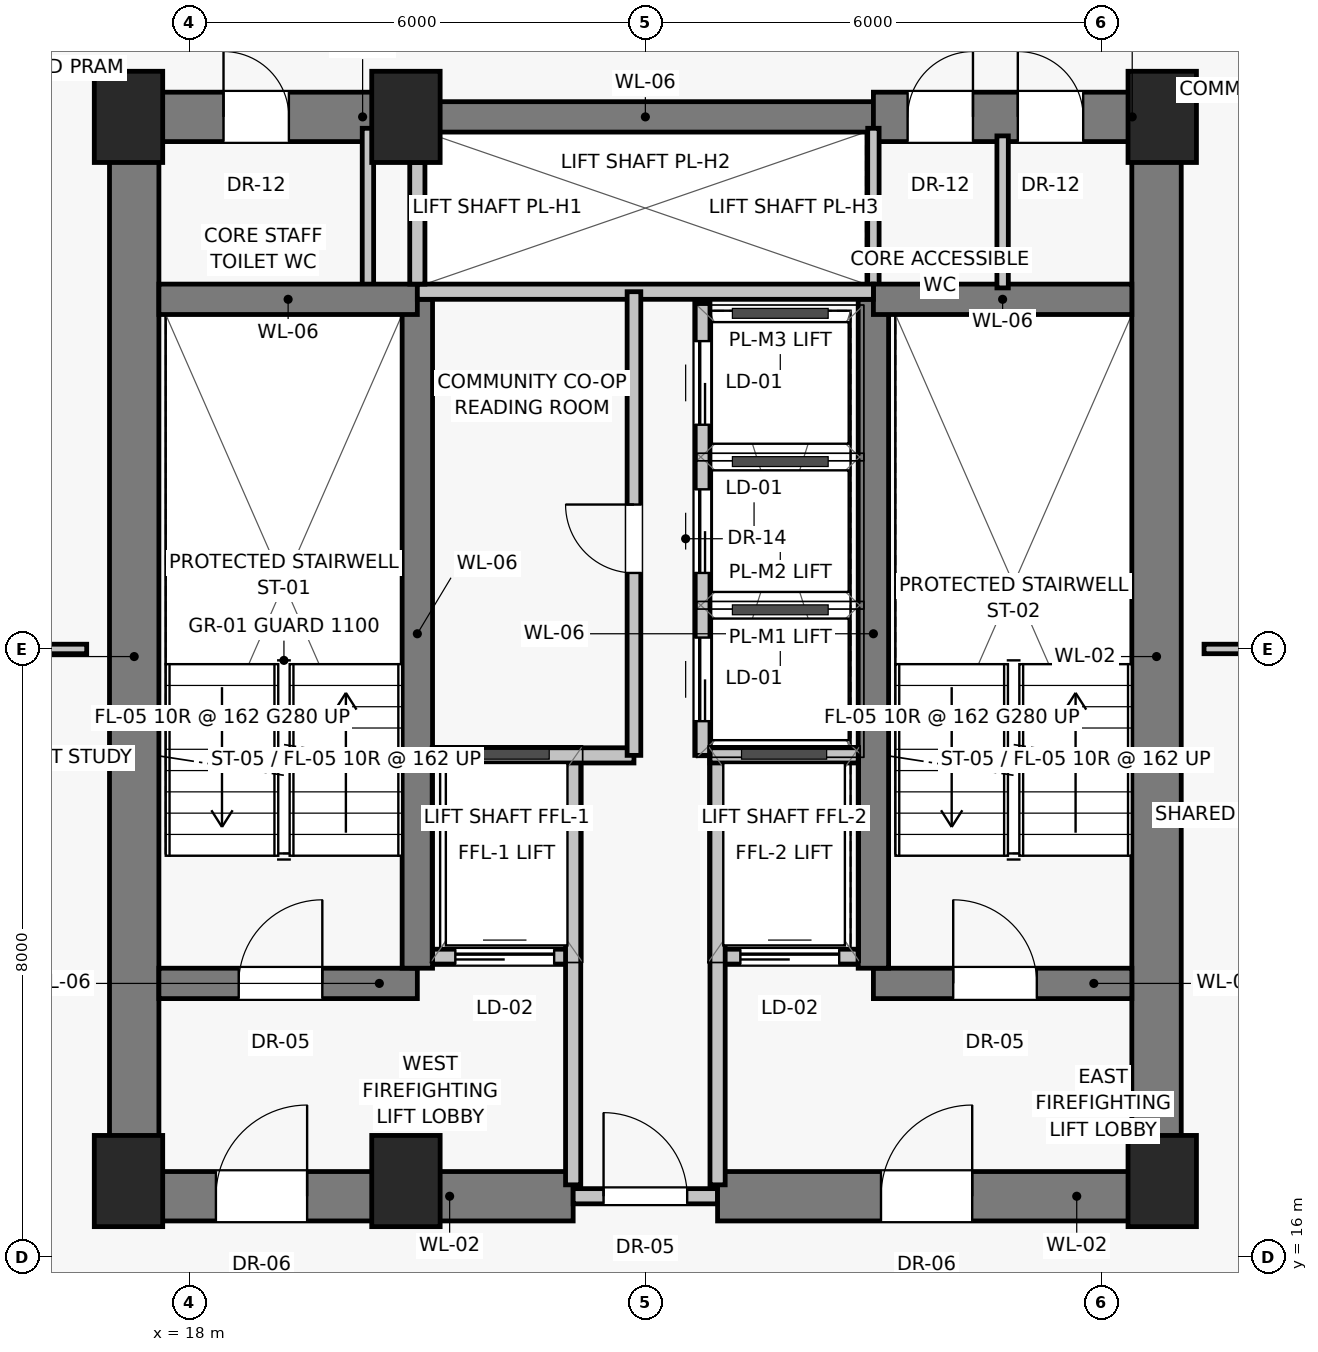
"""IFC4 building model, lengths in metres.
Left out: names, types, materials, properties, quantities, classifications, styles, units other than length and angle.
Written with IfcOpenShell. Run it as: python <this file> out.ifc"""

import sys

from ifc_helpers import new_model, si_unit, direction, frame, frame_2d, origin, origin_2d, place, context, subcontext, project, spatial, rectangle, extrude, source, transform, mapped, element, fill, save


model = new_model("IFC4")
c1 = context("Model", 3, precision=1e-05, world=origin(), true_north=direction((0.0, 1.0)))
c2 = subcontext(c1, "Body", "Model", "MODEL_VIEW")
j1 = project(units=[si_unit("LENGTHUNIT", "METRE"), si_unit("PLANEANGLEUNIT", "RADIAN")], contexts=[c1])
p1 = place(None, origin())
s1 = spatial("IfcSite", under=j1, at=p1, CompositionType="ELEMENT")
p2 = place(p1, origin())
s2 = spatial("IfcBuilding", under=s1, at=p2, CompositionType="ELEMENT")
p3 = place(p2, frame((0.0, 0.0, 126.25)))
s3 = spatial("IfcBuildingStorey", under=s2, at=p3, CompositionType="ELEMENT", Elevation=126.25)
for number, where, z_axis, x_axis in (
    (1, (17.2, 17.0, 0.0), (0.0, 0.0, 1.0), (1.0, 0.0, 0.0)),
    (2, (20.85, 17.0, 0.0), (0.0, 0.0, 1.0), (1.0, 0.0, 0.0)),
    (3, (30.8, 17.0, 0.0), (0.0, 0.0, 1.0), (1.0, 0.0, 0.0)),
    (4, (17.2, 31.0, 0.0), (0.0, 0.0, 1.0), (1.0, 0.0, 0.0)),
    (5, (20.85, 31.0, 0.0), (0.0, 0.0, 1.0), (1.0, 0.0, 0.0)),
    (6, (30.8, 31.0, 0.0), (0.0, 0.0, 1.0), (1.0, 0.0, 0.0)),
):
    element("IfcColumn", number, at=place(p3, frame(where, z_axis=z_axis, x_axis=x_axis)), inside=s3, PredefinedType="PILASTER", context=c2, shape_type="SweptSolid", body=[
        extrude(rectangle(XDim=0.9, YDim=1.2, at=origin_2d()), origin(), (0.0, 0.0, 1.0), 3.25),
    ])
for number, where, z_axis, x_axis in (
    (7, (17.275, 16.8, 0.0), (0.0, 0.0, 1.0), (0.0, 1.0, 0.0)),
    (8, (30.725, 16.8, 0.0), (0.0, 0.0, 1.0), (0.0, 1.0, 0.0)),
):
    element("IfcWall", number, at=place(p3, frame(where, z_axis=z_axis, x_axis=x_axis)), inside=s3, PredefinedType="SHEAR", context=c2, shape_type="SweptSolid", body=[
        extrude(rectangle(XDim=14.2, YDim=0.65, at=frame_2d((7.1, 0.0))), origin(), (0.0, 0.0, 1.0), 3.0),
    ])
p4 = place(p3, frame((17.2, 16.8, 0.0), z_axis=(0.0, 0.0, 1.0), x_axis=(1.0, 0.0, 0.0)))
e9 = element("IfcWall", 9, at=p4, inside=s3, PredefinedType="SHEAR", context=c2, shape_type="SweptSolid", body=[
    extrude(rectangle(XDim=5.85, YDim=0.65, at=frame_2d((2.925, 0.0))), origin(), (0.0, 0.0, 1.0), 3.0),
])
p5 = place(p4, frame((1.15, 0.0, 0.0)))
e10 = element("IfcOpeningElement", 10, at=p5, cuts=e9, PredefinedType="OPENING", context=c2, shape_type="SweptSolid", body=[
    extrude(rectangle(XDim=1.2, YDim=2.03, at=frame_2d((0.6, 1.015))), frame((0.0, 0.335, 0.0), z_axis=(0.0, -1.0, 0.0), x_axis=(1.0, 0.0, 0.0)), (0.0, 0.0, 1.0), 0.67),
])
p6 = place(p3, frame((23.05, 16.8, 0.0), z_axis=(0.0, 0.0, 1.0), x_axis=(1.0, 0.0, 0.0)))
e11 = element("IfcWall", 11, at=p6, inside=s3, PredefinedType="SOLIDWALL", context=c2, shape_type="SweptSolid", body=[
    extrude(rectangle(XDim=1.9, YDim=0.2, at=frame_2d((0.95, 0.0))), origin(), (0.0, 0.0, 1.0), 2.15),
])
p7 = place(p6, frame((0.4, 0.0, 0.0)))
e12 = element("IfcOpeningElement", 12, at=p7, cuts=e11, PredefinedType="OPENING", context=c2, shape_type="SweptSolid", body=[
    extrude(rectangle(XDim=1.1, YDim=2.03, at=frame_2d((0.55, 1.015))), frame((0.0, 0.11, 0.0), z_axis=(0.0, -1.0, 0.0), x_axis=(1.0, 0.0, 0.0)), (0.0, 0.0, 1.0), 0.22),
])
p8 = place(p3, frame((24.95, 16.8, 0.0), z_axis=(0.0, 0.0, 1.0), x_axis=(1.0, 0.0, 0.0)))
e13 = element("IfcWall", 13, at=p8, inside=s3, PredefinedType="SHEAR", context=c2, shape_type="SweptSolid", body=[
    extrude(rectangle(XDim=5.85, YDim=0.65, at=frame_2d((2.925, 0.0))), origin(), (0.0, 0.0, 1.0), 3.0),
])
p9 = place(p8, frame((2.15, 0.0, 0.0)))
e14 = element("IfcOpeningElement", 14, at=p9, cuts=e13, PredefinedType="OPENING", context=c2, shape_type="SweptSolid", body=[
    extrude(rectangle(XDim=1.2, YDim=2.03, at=frame_2d((0.6, 1.015))), frame((0.0, 0.335, 0.0), z_axis=(0.0, -1.0, 0.0), x_axis=(1.0, 0.0, 0.0)), (0.0, 0.0, 1.0), 0.67),
])
p10 = place(p3, frame((17.2, 31.0, 0.0), z_axis=(0.0, 0.0, 1.0), x_axis=(1.0, 0.0, 0.0)))
e15 = element("IfcWall", 15, at=p10, inside=s3, PredefinedType="SHEAR", context=c2, shape_type="SweptSolid", body=[
    extrude(rectangle(XDim=3.8, YDim=0.65, at=frame_2d((1.9, 0.0))), origin(), (0.0, 0.0, 1.0), 3.0),
])
p11 = place(p10, frame((1.25, 0.0, 0.0)))
e16 = element("IfcOpeningElement", 16, at=p11, cuts=e15, PredefinedType="OPENING", context=c2, shape_type="SweptSolid", body=[
    extrude(rectangle(XDim=0.86, YDim=2.01, at=frame_2d((0.43, 1.005))), frame((0.0, 0.335, 0.0), z_axis=(0.0, -1.0, 0.0), x_axis=(1.0, 0.0, 0.0)), (0.0, 0.0, 1.0), 0.67),
])
p12 = place(p3, frame((21.0, 31.0, 0.0), z_axis=(0.0, 0.0, 1.0), x_axis=(1.0, 0.0, 0.0)))
e17 = element("IfcWall", 17, at=p12, inside=s3, PredefinedType="SHEAR", context=c2, shape_type="SweptSolid", body=[
    extrude(rectangle(XDim=6.0, YDim=0.4, at=frame_2d((3.0, 0.0))), origin(), (0.0, 0.0, 1.0), 3.0),
])
p13 = place(p3, frame((27.0, 31.0, 0.0), z_axis=(0.0, 0.0, 1.0), x_axis=(1.0, 0.0, 0.0)))
e18 = element("IfcWall", 18, at=p13, inside=s3, PredefinedType="SHEAR", context=c2, shape_type="SweptSolid", body=[
    extrude(rectangle(XDim=3.8, YDim=0.65, at=frame_2d((1.9, 0.0))), origin(), (0.0, 0.0, 1.0), 3.0),
])
p14 = place(p13, frame((0.45, 0.0, 0.0)))
e19 = element("IfcOpeningElement", 19, at=p14, cuts=e18, PredefinedType="OPENING", context=c2, shape_type="SweptSolid", body=[
    extrude(rectangle(XDim=0.86, YDim=2.01, at=frame_2d((0.43, 1.005))), frame((0.0, 0.335, 0.0), z_axis=(0.0, -1.0, 0.0), x_axis=(1.0, 0.0, 0.0)), (0.0, 0.0, 1.0), 0.67),
])
p15 = place(p13, frame((1.9, 0.0, 0.0)))
e20 = element("IfcOpeningElement", 20, at=p15, cuts=e18, PredefinedType="OPENING", context=c2, shape_type="SweptSolid", body=[
    extrude(rectangle(XDim=0.86, YDim=2.01, at=frame_2d((0.43, 1.005))), frame((0.0, 0.335, 0.0), z_axis=(0.0, -1.0, 0.0), x_axis=(1.0, 0.0, 0.0)), (0.0, 0.0, 1.0), 0.67),
])
for number, where, z_axis, x_axis in (
    (21, (20.35, 28.65, 0.0), (0.0, 0.0, 1.0), (0.0, 1.0, 0.0)),
    (22, (27.0, 28.65, 0.0), (0.0, 0.0, 1.0), (0.0, 1.0, 0.0)),
):
    element("IfcWall", number, at=place(p3, frame(where, z_axis=z_axis, x_axis=x_axis)), inside=s3, PredefinedType="PARTITIONING", context=c2, shape_type="SweptSolid", body=[
        extrude(rectangle(XDim=2.2, YDim=0.15, at=frame_2d((1.1, 0.0))), origin(), (0.0, 0.0, 1.0), 3.0),
    ])
p16 = place(p3, frame((17.6, 19.6, 0.0), z_axis=(0.0, 0.0, 1.0), x_axis=(1.0, 0.0, 0.0)))
e23 = element("IfcWall", 23, at=p16, inside=s3, PredefinedType="SHEAR", context=c2, shape_type="SweptSolid", body=[
    extrude(rectangle(XDim=3.4, YDim=0.4, at=frame_2d((1.7, 0.0))), origin(), (0.0, 0.0, 1.0), 3.0),
])
p17 = place(p16, frame((1.05, 0.0, 0.0)))
e24 = element("IfcOpeningElement", 24, at=p17, cuts=e23, PredefinedType="OPENING", context=c2, shape_type="SweptSolid", body=[
    extrude(rectangle(XDim=1.1, YDim=2.03, at=frame_2d((0.55, 1.015))), frame((0.0, 0.21, 0.0), z_axis=(0.0, -1.0, 0.0), x_axis=(1.0, 0.0, 0.0)), (0.0, 0.0, 1.0), 0.42),
])
p18 = place(p3, frame((21.2, 19.95, 0.0), z_axis=(0.0, 0.0, 1.0), x_axis=(1.0, 0.0, 0.0)))
e25 = element("IfcWall", 25, at=p18, inside=s3, PredefinedType="SOLIDWALL", context=c2, shape_type="SweptSolid", body=[
    extrude(rectangle(XDim=1.85, YDim=0.2, at=frame_2d((0.925, 0.0))), origin(), (0.0, 0.0, 1.0), 3.0),
])
p19 = place(p18, frame((0.3, 0.0, 0.0)))
e26 = element("IfcOpeningElement", 26, at=p19, cuts=e25, PredefinedType="OPENING", context=c2, shape_type="SweptSolid", body=[
    extrude(rectangle(XDim=1.3, YDim=2.25, at=frame_2d((0.65, 1.125))), frame((0.0, 0.11, 0.0), z_axis=(0.0, -1.0, 0.0), x_axis=(1.0, 0.0, 0.0)), (0.0, 0.0, 1.0), 0.22),
])
p20 = place(p3, frame((24.95, 19.95, 0.0), z_axis=(0.0, 0.0, 1.0), x_axis=(1.0, 0.0, 0.0)))
e27 = element("IfcWall", 27, at=p20, inside=s3, PredefinedType="SOLIDWALL", context=c2, shape_type="SweptSolid", body=[
    extrude(rectangle(XDim=1.85, YDim=0.2, at=frame_2d((0.925, 0.0))), origin(), (0.0, 0.0, 1.0), 3.0),
])
p21 = place(p20, frame((0.3, 0.0, 0.0)))
e28 = element("IfcOpeningElement", 28, at=p21, cuts=e27, PredefinedType="OPENING", context=c2, shape_type="SweptSolid", body=[
    extrude(rectangle(XDim=1.3, YDim=2.25, at=frame_2d((0.65, 1.125))), frame((0.0, 0.11, 0.0), z_axis=(0.0, -1.0, 0.0), x_axis=(1.0, 0.0, 0.0)), (0.0, 0.0, 1.0), 0.22),
])
p22 = place(p3, frame((27.0, 19.6, 0.0), z_axis=(0.0, 0.0, 1.0), x_axis=(1.0, 0.0, 0.0)))
e29 = element("IfcWall", 29, at=p22, inside=s3, PredefinedType="SHEAR", context=c2, shape_type="SweptSolid", body=[
    extrude(rectangle(XDim=3.4, YDim=0.4, at=frame_2d((1.7, 0.0))), origin(), (0.0, 0.0, 1.0), 3.0),
])
p23 = place(p22, frame((1.05, 0.0, 0.0)))
e30 = element("IfcOpeningElement", 30, at=p23, cuts=e29, PredefinedType="OPENING", context=c2, shape_type="SweptSolid", body=[
    extrude(rectangle(XDim=1.1, YDim=2.03, at=frame_2d((0.55, 1.015))), frame((0.0, 0.21, 0.0), z_axis=(0.0, -1.0, 0.0), x_axis=(1.0, 0.0, 0.0)), (0.0, 0.0, 1.0), 0.42),
])
for number, where, z_axis, x_axis in (
    (31, (21.0, 19.8, 0.0), (0.0, 0.0, 1.0), (0.0, 1.0, 0.0)),
    (32, (27.0, 19.8, 0.0), (0.0, 0.0, 1.0), (0.0, 1.0, 0.0)),
):
    element("IfcWall", number, at=place(p3, frame(where, z_axis=z_axis, x_axis=x_axis)), inside=s3, PredefinedType="SHEAR", context=c2, shape_type="SweptSolid", body=[
        extrude(rectangle(XDim=8.8, YDim=0.4, at=frame_2d((4.4, 0.0))), origin(), (0.0, 0.0, 1.0), 3.0),
    ])
for number, where, z_axis, x_axis in (
    (33, (17.6, 28.6, 0.0), (0.0, 0.0, 1.0), (1.0, 0.0, 0.0)),
    (34, (27.0, 28.6, 0.0), (0.0, 0.0, 1.0), (1.0, 0.0, 0.0)),
):
    element("IfcWall", number, at=place(p3, frame(where, z_axis=z_axis, x_axis=x_axis)), inside=s3, PredefinedType="SHEAR", context=c2, shape_type="SweptSolid", body=[
        extrude(rectangle(XDim=3.4, YDim=0.4, at=frame_2d((1.7, 0.0))), origin(), (0.0, 0.0, 1.0), 3.0),
    ])
for number, where, z_axis, x_axis in (
    (35, (23.05, 16.95, 0.0), (0.0, 0.0, 1.0), (0.0, 1.0, 0.0)),
    (36, (24.95, 16.95, 0.0), (0.0, 0.0, 1.0), (0.0, 1.0, 0.0)),
):
    element("IfcWall", number, at=place(p3, frame(where, z_axis=z_axis, x_axis=x_axis)), inside=s3, PredefinedType="SOLIDWALL", context=c2, shape_type="SweptSolid", body=[
        extrude(rectangle(XDim=5.6, YDim=0.2, at=frame_2d((2.8, 0.0))), origin(), (0.0, 0.0, 1.0), 3.0),
    ])
p24 = place(p3, frame((21.2, 22.6, 0.0), z_axis=(0.0, 0.0, 1.0), x_axis=(1.0, 0.0, 0.0)))
e37 = element("IfcWall", 37, at=p24, inside=s3, PredefinedType="SOLIDWALL", context=c2, shape_type="SweptSolid", body=[
    extrude(rectangle(XDim=2.65, YDim=0.2, at=frame_2d((1.325, 0.0))), origin(), (0.0, 0.0, 1.0), 3.0),
])
p25 = place(p3, frame((24.85, 22.6, 0.0), z_axis=(0.0, 0.0, 1.0), x_axis=(1.0, 0.0, 0.0)))
e38 = element("IfcWall", 38, at=p25, inside=s3, PredefinedType="SOLIDWALL", context=c2, shape_type="SweptSolid", body=[
    extrude(rectangle(XDim=1.95, YDim=0.2, at=frame_2d((0.975, 0.0))), origin(), (0.0, 0.0, 1.0), 3.0),
])
p26 = place(p3, frame((21.0, 28.7, 0.0), z_axis=(0.0, 0.0, 1.0), x_axis=(1.0, 0.0, 0.0)))
e39 = element("IfcWall", 39, at=p26, inside=s3, PredefinedType="SOLIDWALL", context=c2, shape_type="SweptSolid", body=[
    extrude(rectangle(XDim=6.0, YDim=0.2, at=frame_2d((3.0, 0.0))), origin(), (0.0, 0.0, 1.0), 3.0),
])
p27 = place(p3, frame((21.0, 28.8, 0.0), z_axis=(0.0, 0.0, 1.0), x_axis=(0.0, 1.0, 0.0)))
e40 = element("IfcWall", 40, at=p27, inside=s3, PredefinedType="SOLIDWALL", context=c2, shape_type="SweptSolid", body=[
    extrude(rectangle(XDim=1.6, YDim=0.2, at=frame_2d((0.8, 0.0))), origin(), (0.0, 0.0, 1.0), 3.0),
])
p28 = place(p3, frame((23.85, 22.6, 0.0), z_axis=(0.0, 0.0, 1.0), x_axis=(0.0, 1.0, 0.0)))
e41 = element("IfcWall", 41, at=p28, inside=s3, PredefinedType="PARTITIONING", context=c2, shape_type="SweptSolid", body=[
    extrude(rectangle(XDim=6.1, YDim=0.18, at=frame_2d((3.05, 0.0))), origin(), (0.0, 0.0, 1.0), 3.0),
])
p29 = place(p28, frame((2.4, 0.0, 0.0)))
e42 = element("IfcOpeningElement", 42, at=p29, cuts=e41, PredefinedType="OPENING", context=c2, shape_type="SweptSolid", body=[
    extrude(rectangle(XDim=0.9, YDim=2.01, at=frame_2d((0.45, 1.005))), frame((0.0, 0.1, 0.0), z_axis=(0.0, -1.0, 0.0), x_axis=(1.0, 0.0, 0.0)), (0.0, 0.0, 1.0), 0.2),
])
p30 = place(p3, frame((24.75, 22.6, 0.0), z_axis=(0.0, 0.0, 1.0), x_axis=(0.0, 1.0, 0.0)))
e43 = element("IfcWall", 43, at=p30, inside=s3, PredefinedType="SOLIDWALL", context=c2, shape_type="SweptSolid", body=[
    extrude(rectangle(XDim=5.95, YDim=0.2, at=frame_2d((2.975, 0.0))), origin(), (0.0, 0.0, 1.0), 3.0),
])
p31 = place(p30, frame((0.45, 0.0, 0.0)))
e44 = element("IfcOpeningElement", 44, at=p31, cuts=e43, PredefinedType="OPENING", context=c2, shape_type="SweptSolid", body=[
    extrude(rectangle(XDim=1.1, YDim=2.08, at=frame_2d((0.55, 1.04))), frame((0.0, 0.11, 0.0), z_axis=(0.0, -1.0, 0.0), x_axis=(1.0, 0.0, 0.0)), (0.0, 0.0, 1.0), 0.22),
])
p32 = place(p30, frame((2.4, 0.0, 0.0)))
e45 = element("IfcOpeningElement", 45, at=p32, cuts=e43, PredefinedType="OPENING", context=c2, shape_type="SweptSolid", body=[
    extrude(rectangle(XDim=1.1, YDim=2.08, at=frame_2d((0.55, 1.04))), frame((0.0, 0.11, 0.0), z_axis=(0.0, -1.0, 0.0), x_axis=(1.0, 0.0, 0.0)), (0.0, 0.0, 1.0), 0.22),
])
p33 = place(p30, frame((4.35, 0.0, 0.0)))
e46 = element("IfcOpeningElement", 46, at=p33, cuts=e43, PredefinedType="OPENING", context=c2, shape_type="SweptSolid", body=[
    extrude(rectangle(XDim=1.1, YDim=2.08, at=frame_2d((0.55, 1.04))), frame((0.0, 0.11, 0.0), z_axis=(0.0, -1.0, 0.0), x_axis=(1.0, 0.0, 0.0)), (0.0, 0.0, 1.0), 0.22),
])
p34 = place(p3, frame((28.7, 28.75, 0.0), z_axis=(0.0, 0.0, 1.0), x_axis=(0.0, 1.0, 0.0)))
e47 = element("IfcWall", 47, at=p34, inside=s3, PredefinedType="PARTITIONING", context=c2, shape_type="SweptSolid", body=[
    extrude(rectangle(XDim=2.0, YDim=0.15, at=frame_2d((1.0, 0.0))), origin(), (0.0, 0.0, 1.0), 3.0),
])
for number, where, z_axis, x_axis in (
    (48, (14.55, 24.0, 0.0), (0.0, 0.0, 1.0), (1.0, 0.0, 0.0)),
    (49, (31.35, 24.0, 0.0), (0.0, 0.0, 1.0), (1.0, 0.0, 0.0)),
):
    element("IfcWall", number, at=place(p3, frame(where, z_axis=z_axis, x_axis=x_axis)), inside=s3, PredefinedType="PARTITIONING", context=c2, shape_type="SweptSolid", body=[
        extrude(rectangle(XDim=2.1, YDim=0.125, at=frame_2d((1.05, 0.0))), origin(), (0.0, 0.0, 1.0), 3.0),
    ])
m1 = source(origin(), c2, "Body", "SweptSolid", [
    extrude(rectangle(XDim=1.2, YDim=2.03, at=frame_2d((0.6, 1.015))), frame((0.0, 0.025, 0.0), z_axis=(0.0, -1.0, 0.0), x_axis=(1.0, 0.0, 0.0)), (0.0, 0.0, 1.0), 0.05),
])
p35 = place(p5, origin())
e50 = element("IfcDoor", 50, at=p35, inside=s3, OperationType="SINGLE_SWING_RIGHT", PredefinedType="DOOR", context=c2, shape_type="MappedRepresentation", body=[
    mapped(m1, transform((0.0, 0.0, 0.0), scale=1.0)),
])
fill(e10, e50)
m2 = source(origin(), c2, "Body", "SweptSolid", [
    extrude(rectangle(XDim=1.1, YDim=2.03, at=frame_2d((0.55, 1.015))), frame((0.0, 0.025, 0.0), z_axis=(0.0, -1.0, 0.0), x_axis=(1.0, 0.0, 0.0)), (0.0, 0.0, 1.0), 0.05),
])
p36 = place(p7, origin())
e51 = element("IfcDoor", 51, at=p36, inside=s3, OperationType="SINGLE_SWING_LEFT", PredefinedType="DOOR", context=c2, shape_type="MappedRepresentation", body=[
    mapped(m2, transform((0.0, 0.0, 0.0), scale=1.0)),
])
fill(e12, e51)
p37 = place(p9, origin())
e52 = element("IfcDoor", 52, at=p37, inside=s3, OperationType="SINGLE_SWING_RIGHT", PredefinedType="DOOR", context=c2, shape_type="MappedRepresentation", body=[
    mapped(m1, transform((0.0, 0.0, 0.0), scale=1.0)),
])
fill(e14, e52)
m3 = source(origin(), c2, "Body", "SweptSolid", [
    extrude(rectangle(XDim=0.86, YDim=2.01, at=frame_2d((0.43, 1.005))), frame((0.0, 0.025, 0.0), z_axis=(0.0, -1.0, 0.0), x_axis=(1.0, 0.0, 0.0)), (0.0, 0.0, 1.0), 0.05),
])
p38 = place(p11, origin())
e53 = element("IfcDoor", 53, at=p38, inside=s3, OperationType="SINGLE_SWING_LEFT", PredefinedType="DOOR", context=c2, shape_type="MappedRepresentation", body=[
    mapped(m3, transform((0.0, 0.0, 0.0), scale=1.0)),
])
fill(e16, e53)
p39 = place(p14, origin())
e54 = element("IfcDoor", 54, at=p39, inside=s3, OperationType="SINGLE_SWING_RIGHT", PredefinedType="DOOR", context=c2, shape_type="MappedRepresentation", body=[
    mapped(m3, transform((0.0, 0.0, 0.0), scale=1.0)),
])
fill(e19, e54)
p40 = place(p15, origin())
e55 = element("IfcDoor", 55, at=p40, inside=s3, OperationType="SINGLE_SWING_LEFT", PredefinedType="DOOR", context=c2, shape_type="MappedRepresentation", body=[
    mapped(m3, transform((0.0, 0.0, 0.0), scale=1.0)),
])
fill(e20, e55)
p41 = place(p17, origin())
e56 = element("IfcDoor", 56, at=p41, inside=s3, OperationType="SINGLE_SWING_RIGHT", PredefinedType="DOOR", context=c2, shape_type="MappedRepresentation", body=[
    mapped(m2, transform((0.0, 0.0, 0.0), scale=1.0)),
])
fill(e24, e56)
m4 = source(origin(), c2, "Body", "SweptSolid", [
    extrude(rectangle(XDim=1.3, YDim=2.25, at=frame_2d((0.65, 1.125))), frame((0.0, 0.025, 0.0), z_axis=(0.0, -1.0, 0.0), x_axis=(1.0, 0.0, 0.0)), (0.0, 0.0, 1.0), 0.05),
])
p42 = place(p19, origin())
e57 = element("IfcDoor", 57, at=p42, inside=s3, OperationType="SLIDING_TO_LEFT", PredefinedType="DOOR", context=c2, shape_type="MappedRepresentation", body=[
    mapped(m4, transform((0.0, 0.0, 0.0), scale=1.0)),
])
fill(e26, e57)
p43 = place(p21, origin())
e58 = element("IfcDoor", 58, at=p43, inside=s3, OperationType="SLIDING_TO_LEFT", PredefinedType="DOOR", context=c2, shape_type="MappedRepresentation", body=[
    mapped(m4, transform((0.0, 0.0, 0.0), scale=1.0)),
])
fill(e28, e58)
p44 = place(p23, origin())
e59 = element("IfcDoor", 59, at=p44, inside=s3, OperationType="SINGLE_SWING_LEFT", PredefinedType="DOOR", context=c2, shape_type="MappedRepresentation", body=[
    mapped(m2, transform((0.0, 0.0, 0.0), scale=1.0)),
])
fill(e30, e59)
m5 = source(origin(), c2, "Body", "SweptSolid", [
    extrude(rectangle(XDim=0.9, YDim=2.01, at=frame_2d((0.45, 1.005))), frame((0.0, 0.025, 0.0), z_axis=(0.0, -1.0, 0.0), x_axis=(1.0, 0.0, 0.0)), (0.0, 0.0, 1.0), 0.05),
])
p45 = place(p29, origin())
e60 = element("IfcDoor", 60, at=p45, inside=s3, OperationType="SINGLE_SWING_RIGHT", PredefinedType="DOOR", context=c2, shape_type="MappedRepresentation", body=[
    mapped(m5, transform((0.0, 0.0, 0.0), scale=1.0)),
])
fill(e42, e60)
m6 = source(origin(), c2, "Body", "SweptSolid", [
    extrude(rectangle(XDim=1.1, YDim=2.08, at=frame_2d((0.55, 1.04))), frame((0.0, 0.025, 0.0), z_axis=(0.0, -1.0, 0.0), x_axis=(1.0, 0.0, 0.0)), (0.0, 0.0, 1.0), 0.05),
])
p46 = place(p31, origin())
e61 = element("IfcDoor", 61, at=p46, inside=s3, OperationType="SLIDING_TO_LEFT", PredefinedType="DOOR", context=c2, shape_type="MappedRepresentation", body=[
    mapped(m6, transform((0.0, 0.0, 0.0), scale=1.0)),
])
fill(e44, e61)
p47 = place(p32, origin())
e62 = element("IfcDoor", 62, at=p47, inside=s3, OperationType="SLIDING_TO_LEFT", PredefinedType="DOOR", context=c2, shape_type="MappedRepresentation", body=[
    mapped(m6, transform((0.0, 0.0, 0.0), scale=1.0)),
])
fill(e45, e62)
p48 = place(p33, origin())
e63 = element("IfcDoor", 63, at=p48, inside=s3, OperationType="SLIDING_TO_LEFT", PredefinedType="DOOR", context=c2, shape_type="MappedRepresentation", body=[
    mapped(m6, transform((0.0, 0.0, 0.0), scale=1.0)),
])
fill(e46, e63)
save(model, sys.argv[1])
